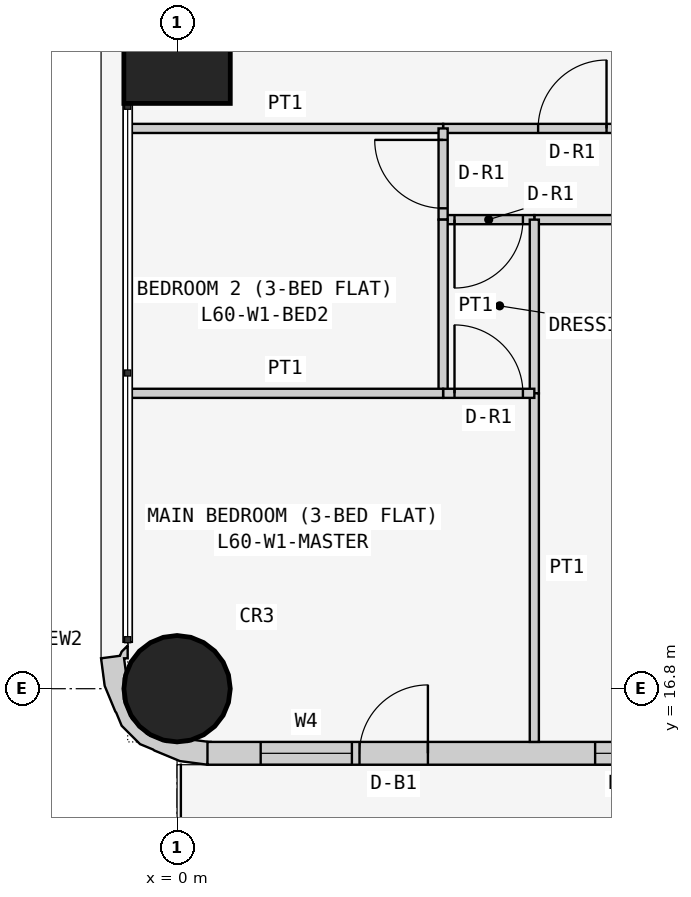
"""IFC4 building model, lengths in metres.
Left out: names, types, materials, properties, quantities, classifications, styles, units other than length and angle.
Written with IfcOpenShell. Run it as: python <this file> out.ifc"""

import sys

from ifc_helpers import new_model, si_unit, direction, frame, frame_2d, origin, origin_2d, place, context, subcontext, project, spatial, polyline, rectangle, circle, outline, extrude, element, fill, save


model = new_model("IFC4")
c1 = context("Model", 3, precision=1e-05, world=origin(), true_north=direction((0.0, 1.0)))
c2 = subcontext(c1, "Body", "Model", "MODEL_VIEW")
j1 = project(units=[si_unit("LENGTHUNIT", "METRE"), si_unit("PLANEANGLEUNIT", "RADIAN")], contexts=[c1])
p1 = place(None, origin())
s1 = spatial("IfcSite", under=j1, at=p1, CompositionType="ELEMENT")
p2 = place(p1, origin())
s2 = spatial("IfcBuilding", under=s1, at=p2, CompositionType="ELEMENT")
p3 = place(p2, frame((0.0, 0.0, 230.1)))
s3 = spatial("IfcBuildingStorey", under=s2, at=p3, CompositionType="ELEMENT", Elevation=230.1)
p4 = place(p3, frame((0.0, 16.8, 0.0), z_axis=(0.0, 0.0, 1.0), x_axis=(1.0, 0.0, 0.0)))
e1 = element("IfcColumn", 1, at=p4, inside=s3, PredefinedType="COLUMN", context=c2, shape_type="SweptSolid", body=[
    extrude(circle(Radius=0.7, at=origin_2d()), origin(), (0.0, 0.0, 1.0), 3.6),
])
p5 = place(p3, frame((0.0, 25.2, 0.0), z_axis=(0.0, 0.0, 1.0), x_axis=(1.0, 0.0, 0.0)))
e2 = element("IfcColumn", 2, at=p5, inside=s3, PredefinedType="COLUMN", context=c2, shape_type="SweptSolid", body=[
    extrude(rectangle(XDim=1.4, YDim=1.4, at=origin_2d()), origin(), (0.0, 0.0, 1.0), 3.6),
])
p6 = place(p3, frame((0.4, 15.95, 0.0), z_axis=(0.0, 0.0, 1.0), x_axis=(1.0, 0.0, 0.0)))
e3 = element("IfcWall", 3, at=p6, inside=s3, PredefinedType="SOLIDWALL", context=c2, shape_type="SweptSolid", body=[
    extrude(rectangle(XDim=15.7, YDim=0.3, at=frame_2d((7.85, 0.0))), origin(), (0.0, 0.0, 1.0), 3.45),
])
p7 = place(p6, frame((12.4, 0.0, 0.9)))
e4 = element("IfcOpeningElement", 4, at=p7, cuts=e3, PredefinedType="OPENING", context=c2, shape_type="SweptSolid", body=[
    extrude(rectangle(XDim=1.8, YDim=1.5, at=frame_2d((0.9, 0.75))), frame((0.0, 0.16, 0.0), z_axis=(0.0, -1.0, 0.0), x_axis=(1.0, 0.0, 0.0)), (0.0, 0.0, 1.0), 0.32),
])
p8 = place(p6, frame((9.55, 0.0, 1.5)))
e5 = element("IfcOpeningElement", 5, at=p8, cuts=e3, PredefinedType="OPENING", context=c2, shape_type="SweptSolid", body=[
    extrude(rectangle(XDim=0.9, YDim=0.7, at=frame_2d((0.45, 0.35))), frame((0.0, 0.16, 0.0), z_axis=(0.0, -1.0, 0.0), x_axis=(1.0, 0.0, 0.0)), (0.0, 0.0, 1.0), 0.32),
])
p9 = place(p6, frame((5.1, 0.0, 0.9)))
e6 = element("IfcOpeningElement", 6, at=p9, cuts=e3, PredefinedType="OPENING", context=c2, shape_type="SweptSolid", body=[
    extrude(rectangle(XDim=1.8, YDim=1.5, at=frame_2d((0.9, 0.75))), frame((0.0, 0.16, 0.0), z_axis=(0.0, -1.0, 0.0), x_axis=(1.0, 0.0, 0.0)), (0.0, 0.0, 1.0), 0.32),
])
p10 = place(p6, frame((2.0, 0.0, 0.0)))
e7 = element("IfcOpeningElement", 7, at=p10, cuts=e3, PredefinedType="OPENING", context=c2, shape_type="SweptSolid", body=[
    extrude(rectangle(XDim=0.9, YDim=2.4, at=frame_2d((0.45, 1.2))), frame((0.0, 0.16, 0.0), z_axis=(0.0, -1.0, 0.0), x_axis=(1.0, 0.0, 0.0)), (0.0, 0.0, 1.0), 0.32),
])
p11 = place(p6, frame((0.7, 0.0, 0.9)))
e8 = element("IfcOpeningElement", 8, at=p11, cuts=e3, PredefinedType="OPENING", context=c2, shape_type="SweptSolid", body=[
    extrude(rectangle(XDim=1.2, YDim=1.5, at=frame_2d((0.6, 0.75))), frame((0.0, 0.16, 0.0), z_axis=(0.0, -1.0, 0.0), x_axis=(1.0, 0.0, 0.0)), (0.0, 0.0, 1.0), 0.32),
])
p12 = place(p3, frame((-0.588, 17.312, 0.0), z_axis=(0.0, 0.0, 1.0), x_axis=(-0.898030234854, -0.439933741929, 0.0)))
e9 = element("IfcWall", 9, at=p12, inside=s3, PredefinedType="SOLIDWALL", context=c2, shape_type="SweptSolid", body=[
    extrude(outline(polyline([(-0.222, 1.793), (-0.39, 1.541), (-0.372, 1.532), (-0.195, 1.415), (-0.12, 1.41), (0.131, 1.287), (0.315, 1.078), (0.406, 0.814), (0.388, 0.536), (0.265, 0.285), (0.209, 0.236), (0.148, 0.053), (0.105, 0.074), (0.032, -0.076), (0.138, -0.039), (0.182, -0.0), (0.419, -0.08), (0.536, 0.266), (0.559, 0.631), (0.555, 0.651), (0.566, 0.836), (0.456, 1.159), (0.333, 1.298), (0.324, 1.316), (0.082, 1.591), (-0.222, 1.793)])), origin(), (0.0, 0.0, 1.0), 3.45),
])
p13 = place(p3, frame((3.5, 24.171, 0.0), z_axis=(0.0, 0.0, 1.0), x_axis=(1.0, 0.0, 0.0)))
e10 = element("IfcWall", 10, at=p13, inside=s3, PredefinedType="PARTITIONING", context=c2, shape_type="SweptSolid", body=[
    extrude(rectangle(XDim=2.7, YDim=0.12, at=frame_2d((1.35, 0.0))), origin(), (0.0, 0.0, 1.0), 3.45),
])
p14 = place(p13, frame((1.25, 0.0, 0.0)))
e11 = element("IfcOpeningElement", 11, at=p14, cuts=e10, PredefinedType="OPENING", context=c2, shape_type="SweptSolid", body=[
    extrude(rectangle(XDim=0.9, YDim=2.1, at=frame_2d((0.45, 1.05))), frame((0.0, 0.07, 0.0), z_axis=(0.0, -1.0, 0.0), x_axis=(1.0, 0.0, 0.0)), (0.0, 0.0, 1.0), 0.14),
])
p15 = place(p3, frame((-0.65, 24.171, 0.0), z_axis=(0.0, 0.0, 1.0), x_axis=(1.0, 0.0, 0.0)))
e12 = element("IfcWall", 12, at=p15, inside=s3, PredefinedType="PARTITIONING", context=c2, shape_type="SweptSolid", body=[
    extrude(rectangle(XDim=4.15, YDim=0.12, at=frame_2d((2.075, 0.0))), origin(), (0.0, 0.0, 1.0), 3.45),
])
p16 = place(p3, frame((4.7, 22.971, 0.0), z_axis=(0.0, 0.0, 1.0), x_axis=(1.0, 0.0, 0.0)))
e13 = element("IfcWall", 13, at=p16, inside=s3, PredefinedType="PARTITIONING", context=c2, shape_type="SweptSolid", body=[
    extrude(rectangle(XDim=4.9, YDim=0.12, at=frame_2d((2.45, 0.0))), origin(), (0.0, 0.0, 1.0), 3.45),
])
p17 = place(p16, frame((1.65, 0.0, 0.0)))
e14 = element("IfcOpeningElement", 14, at=p17, cuts=e13, PredefinedType="OPENING", context=c2, shape_type="SweptSolid", body=[
    extrude(rectangle(XDim=0.9, YDim=2.1, at=frame_2d((0.45, 1.05))), frame((0.0, 0.07, 0.0), z_axis=(0.0, -1.0, 0.0), x_axis=(1.0, 0.0, 0.0)), (0.0, 0.0, 1.0), 0.14),
])
p18 = place(p3, frame((3.5, 22.971, 0.0), z_axis=(0.0, 0.0, 1.0), x_axis=(1.0, 0.0, 0.0)))
e15 = element("IfcWall", 15, at=p18, inside=s3, PredefinedType="PARTITIONING", context=c2, shape_type="SweptSolid", body=[
    extrude(rectangle(XDim=1.2, YDim=0.12, at=frame_2d((0.6, 0.0))), origin(), (0.0, 0.0, 1.0), 3.45),
])
p19 = place(p18, frame((0.15, 0.0, 0.0)))
e16 = element("IfcOpeningElement", 16, at=p19, cuts=e15, PredefinedType="OPENING", context=c2, shape_type="SweptSolid", body=[
    extrude(rectangle(XDim=0.9, YDim=2.1, at=frame_2d((0.45, 1.05))), frame((0.0, 0.07, 0.0), z_axis=(0.0, -1.0, 0.0), x_axis=(1.0, 0.0, 0.0)), (0.0, 0.0, 1.0), 0.14),
])
p20 = place(p3, frame((3.5, 24.171, 0.0), z_axis=(0.0, 0.0, 1.0), x_axis=(0.0, -1.0, 0.0)))
e17 = element("IfcWall", 17, at=p20, inside=s3, PredefinedType="PARTITIONING", context=c2, shape_type="SweptSolid", body=[
    extrude(rectangle(XDim=1.2, YDim=0.12, at=frame_2d((0.6, 0.0))), origin(), (0.0, 0.0, 1.0), 3.45),
])
p21 = place(p20, frame((0.151, 0.0, 0.0)))
e18 = element("IfcOpeningElement", 18, at=p21, cuts=e17, PredefinedType="OPENING", context=c2, shape_type="SweptSolid", body=[
    extrude(rectangle(XDim=0.9, YDim=2.1, at=frame_2d((0.45, 1.05))), frame((0.0, 0.07, 0.0), z_axis=(0.0, -1.0, 0.0), x_axis=(1.0, 0.0, 0.0)), (0.0, 0.0, 1.0), 0.14),
])
p22 = place(p3, frame((4.7, 22.971, 0.0), z_axis=(0.0, 0.0, 1.0), x_axis=(0.0, -1.0, 0.0)))
e19 = element("IfcWall", 19, at=p22, inside=s3, PredefinedType="PARTITIONING", context=c2, shape_type="SweptSolid", body=[
    extrude(rectangle(XDim=2.285, YDim=0.12, at=frame_2d((1.143, 0.0))), origin(), (0.0, 0.0, 1.0), 3.45),
])
p23 = place(p3, frame((4.7, 20.686, 0.0), z_axis=(0.0, 0.0, 1.0), x_axis=(0.0, -1.0, 0.0)))
e20 = element("IfcWall", 20, at=p23, inside=s3, PredefinedType="PARTITIONING", context=c2, shape_type="SweptSolid", body=[
    extrude(rectangle(XDim=4.586, YDim=0.12, at=frame_2d((2.293, 0.0))), origin(), (0.0, 0.0, 1.0), 3.45),
])
p24 = place(p3, frame((3.5, 22.971, 0.0), z_axis=(0.0, 0.0, 1.0), x_axis=(0.0, -1.0, 0.0)))
e21 = element("IfcWall", 21, at=p24, inside=s3, PredefinedType="PARTITIONING", context=c2, shape_type="SweptSolid", body=[
    extrude(rectangle(XDim=2.285, YDim=0.12, at=frame_2d((1.143, 0.0))), origin(), (0.0, 0.0, 1.0), 3.45),
])
p25 = place(p3, frame((3.5, 20.686, 0.0), z_axis=(0.0, 0.0, 1.0), x_axis=(1.0, 0.0, 0.0)))
e22 = element("IfcWall", 22, at=p25, inside=s3, PredefinedType="PARTITIONING", context=c2, shape_type="SweptSolid", body=[
    extrude(rectangle(XDim=1.2, YDim=0.12, at=frame_2d((0.6, 0.0))), origin(), (0.0, 0.0, 1.0), 3.45),
])
p26 = place(p25, frame((0.15, 0.0, 0.0)))
e23 = element("IfcOpeningElement", 23, at=p26, cuts=e22, PredefinedType="OPENING", context=c2, shape_type="SweptSolid", body=[
    extrude(rectangle(XDim=0.9, YDim=2.1, at=frame_2d((0.45, 1.05))), frame((0.0, 0.07, 0.0), z_axis=(0.0, -1.0, 0.0), x_axis=(1.0, 0.0, 0.0)), (0.0, 0.0, 1.0), 0.14),
])
p27 = place(p3, frame((-0.65, 20.686, 0.0), z_axis=(0.0, 0.0, 1.0), x_axis=(1.0, 0.0, 0.0)))
e24 = element("IfcWall", 24, at=p27, inside=s3, PredefinedType="PARTITIONING", context=c2, shape_type="SweptSolid", body=[
    extrude(rectangle(XDim=4.15, YDim=0.12, at=frame_2d((2.075, 0.0))), origin(), (0.0, 0.0, 1.0), 3.45),
])
p28 = place(p9, origin())
e25 = element("IfcWindow", 25, at=p28, inside=s3, PartitioningType="SINGLE_PANEL", PredefinedType="WINDOW", context=c2, shape_type="SweptSolid", body=[
    extrude(rectangle(XDim=1.8, YDim=1.5, at=frame_2d((0.9, 0.75))), frame((0.0, 0.03, 0.0), z_axis=(0.0, -1.0, 0.0), x_axis=(1.0, 0.0, 0.0)), (0.0, 0.0, 1.0), 0.06),
])
fill(e6, e25)
p29 = place(p10, origin())
e26 = element("IfcDoor", 26, at=p29, inside=s3, OperationType="SINGLE_SWING_RIGHT", PredefinedType="DOOR", context=c2, shape_type="SweptSolid", body=[
    extrude(rectangle(XDim=0.9, YDim=2.4, at=frame_2d((0.45, 1.2))), frame((0.0, 0.025, 0.0), z_axis=(0.0, -1.0, 0.0), x_axis=(1.0, 0.0, 0.0)), (0.0, 0.0, 1.0), 0.05),
])
fill(e7, e26)
p30 = place(p11, origin())
e27 = element("IfcWindow", 27, at=p30, inside=s3, PartitioningType="SINGLE_PANEL", PredefinedType="WINDOW", context=c2, shape_type="SweptSolid", body=[
    extrude(rectangle(XDim=1.2, YDim=1.5, at=frame_2d((0.6, 0.75))), frame((0.0, 0.03, 0.0), z_axis=(0.0, -1.0, 0.0), x_axis=(1.0, 0.0, 0.0)), (0.0, 0.0, 1.0), 0.06),
])
fill(e8, e27)
p31 = place(p14, origin())
e28 = element("IfcDoor", 28, at=p31, inside=s3, OperationType="SINGLE_SWING_RIGHT", PredefinedType="DOOR", context=c2, shape_type="SweptSolid", body=[
    extrude(rectangle(XDim=0.9, YDim=2.1, at=frame_2d((0.45, 1.05))), frame((0.0, 0.025, 0.0), z_axis=(0.0, -1.0, 0.0), x_axis=(1.0, 0.0, 0.0)), (0.0, 0.0, 1.0), 0.05),
])
fill(e11, e28)
p32 = place(p19, frame((0.9, 0.0, 0.0), z_axis=(0.0, 0.0, 1.0), x_axis=(-1.0, 0.0, 0.0)))
e29 = element("IfcDoor", 29, at=p32, inside=s3, OperationType="SINGLE_SWING_RIGHT", PredefinedType="DOOR", context=c2, shape_type="SweptSolid", body=[
    extrude(rectangle(XDim=0.9, YDim=2.1, at=frame_2d((0.45, 1.05))), frame((0.0, 0.025, 0.0), z_axis=(0.0, -1.0, 0.0), x_axis=(1.0, 0.0, 0.0)), (0.0, 0.0, 1.0), 0.05),
])
fill(e16, e29)
p33 = place(p26, origin())
e30 = element("IfcDoor", 30, at=p33, inside=s3, OperationType="SINGLE_SWING_LEFT", PredefinedType="DOOR", context=c2, shape_type="SweptSolid", body=[
    extrude(rectangle(XDim=0.9, YDim=2.1, at=frame_2d((0.45, 1.05))), frame((0.0, 0.025, 0.0), z_axis=(0.0, -1.0, 0.0), x_axis=(1.0, 0.0, 0.0)), (0.0, 0.0, 1.0), 0.05),
])
fill(e23, e30)
p34 = place(p21, frame((0.9, 0.0, 0.0), z_axis=(0.0, 0.0, 1.0), x_axis=(-1.0, 0.0, 0.0)))
e31 = element("IfcDoor", 31, at=p34, inside=s3, OperationType="SINGLE_SWING_RIGHT", PredefinedType="DOOR", context=c2, shape_type="SweptSolid", body=[
    extrude(rectangle(XDim=0.9, YDim=2.1, at=frame_2d((0.45, 1.05))), frame((0.0, 0.025, 0.0), z_axis=(0.0, -1.0, 0.0), x_axis=(1.0, 0.0, 0.0)), (0.0, 0.0, 1.0), 0.05),
])
fill(e18, e31)
save(model, sys.argv[1])
